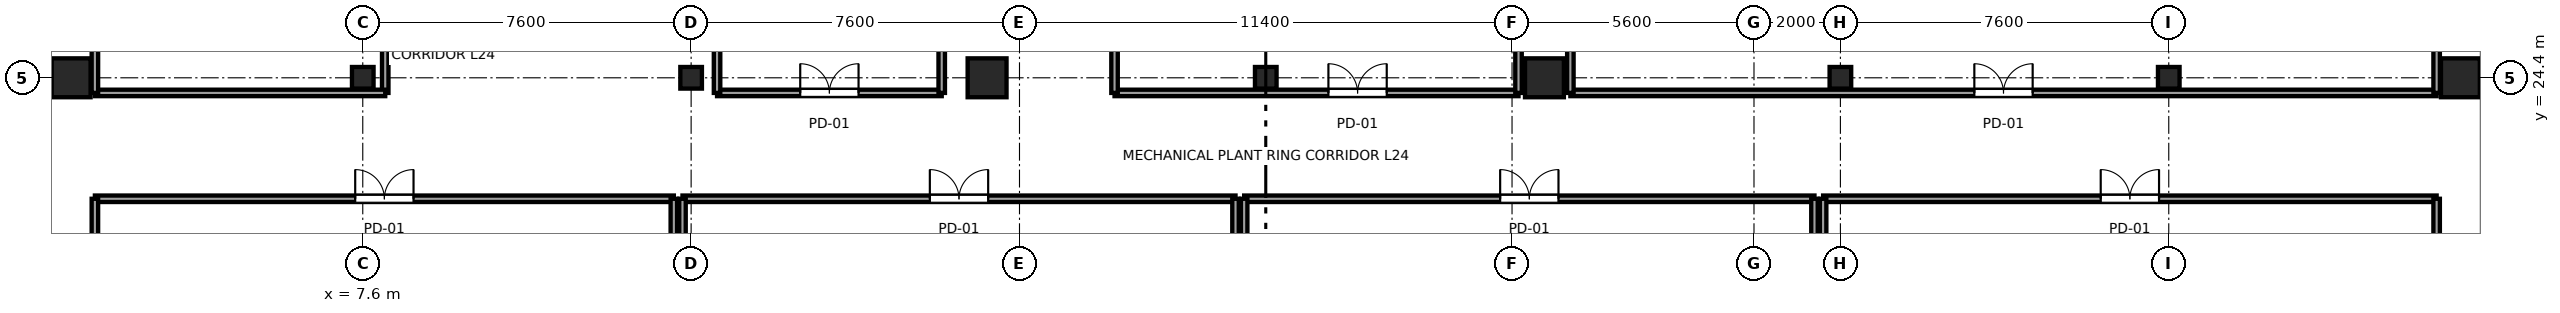
"""IFC4 building model, lengths in metres.
Left out: names, types, materials, properties, quantities, classifications, styles, units other than length and angle.
Written with IfcOpenShell. Run it as: python <this file> out.ifc"""

import sys

from ifc_helpers import new_model, si_unit, direction, frame, frame_2d, origin, origin_2d, place, context, subcontext, project, spatial, rectangle, i_section, extrude, source, transform, mapped, element, fill, save


model = new_model("IFC4")
c1 = context("Model", 3, precision=1e-05, world=origin(), true_north=direction((0.0, 1.0)))
c2 = subcontext(c1, "Body", "Model", "MODEL_VIEW")
j1 = project(units=[si_unit("LENGTHUNIT", "METRE"), si_unit("PLANEANGLEUNIT", "RADIAN")], contexts=[c1])
p1 = place(None, origin())
s1 = spatial("IfcSite", under=j1, at=p1, CompositionType="ELEMENT")
p2 = place(p1, origin())
s2 = spatial("IfcBuilding", under=s1, at=p2, CompositionType="ELEMENT")
p3 = place(p2, frame((0.0, 0.0, 95.9)))
s3 = spatial("IfcBuildingStorey", under=s2, at=p3, CompositionType="ELEMENT", Elevation=95.9)
m1 = source(origin(), c2, "Body", "SweptSolid", [
    extrude(rectangle(XDim=0.9, YDim=0.9, at=origin_2d()), origin(), (0.0, 0.0, 1.0), 5.0),
])
p4 = place(p3, frame((0.85, 24.4, 0.0), z_axis=(0.0, 0.0, 1.0), x_axis=(1.0, 0.0, 0.0)))
e1 = element("IfcColumn", 1, at=p4, inside=s3, PredefinedType="COLUMN", context=c2, shape_type="MappedRepresentation", body=[
    mapped(m1, transform((0.0, 0.0, 0.0), x_axis=(1.0, 0.0, 0.0), y_axis=(0.0, 1.0, 0.0), z_axis=(0.0, 0.0, 1.0), scale=1.0)),
])
m2 = source(origin(), c2, "Body", "SweptSolid", [
    extrude(i_section(OverallWidth=0.5, OverallDepth=0.5, WebThickness=0.022, FlangeThickness=0.034, at=origin_2d()), origin(), (0.0, 0.0, 1.0), 5.0),
])
for number, where, z_axis, x_axis in (
    (2, (7.6, 24.4, 0.0), (0.0, 0.0, 1.0), (1.0, 0.0, 0.0)),
    (3, (15.2, 24.4, 0.0), (0.0, 0.0, 1.0), (1.0, 0.0, 0.0)),
):
    element("IfcColumn", number, at=place(p3, frame(where, z_axis=z_axis, x_axis=x_axis)), inside=s3, PredefinedType="COLUMN", context=c2, shape_type="MappedRepresentation", body=[
        mapped(m2, transform((0.0, 0.0, 0.0), x_axis=(1.0, 0.0, 0.0), y_axis=(0.0, 1.0, 0.0), z_axis=(0.0, 0.0, 1.0), scale=1.0)),
    ])
for number, where, z_axis, x_axis in (
    (4, (22.05, 24.4, 0.0), (0.0, 0.0, 1.0), (1.0, 0.0, 0.0)),
    (5, (34.95, 24.4, 0.0), (0.0, 0.0, 1.0), (1.0, 0.0, 0.0)),
):
    element("IfcColumn", number, at=place(p3, frame(where, z_axis=z_axis, x_axis=x_axis)), inside=s3, PredefinedType="COLUMN", context=c2, shape_type="MappedRepresentation", body=[
        mapped(m1, transform((0.0, 0.0, 0.0), x_axis=(1.0, 0.0, 0.0), y_axis=(0.0, 1.0, 0.0), z_axis=(0.0, 0.0, 1.0), scale=1.0)),
    ])
for number, where, z_axis, x_axis in (
    (6, (41.8, 24.4, 0.0), (0.0, 0.0, 1.0), (1.0, 0.0, 0.0)),
    (7, (49.4, 24.4, 0.0), (0.0, 0.0, 1.0), (1.0, 0.0, 0.0)),
):
    element("IfcColumn", number, at=place(p3, frame(where, z_axis=z_axis, x_axis=x_axis)), inside=s3, PredefinedType="COLUMN", context=c2, shape_type="MappedRepresentation", body=[
        mapped(m2, transform((0.0, 0.0, 0.0), x_axis=(1.0, 0.0, 0.0), y_axis=(0.0, 1.0, 0.0), z_axis=(0.0, 0.0, 1.0), scale=1.0)),
    ])
p5 = place(p3, frame((56.15, 24.4, 0.0), z_axis=(0.0, 0.0, 1.0), x_axis=(1.0, 0.0, 0.0)))
e8 = element("IfcColumn", 8, at=p5, inside=s3, PredefinedType="COLUMN", context=c2, shape_type="MappedRepresentation", body=[
    mapped(m1, transform((0.0, 0.0, 0.0), x_axis=(1.0, 0.0, 0.0), y_axis=(0.0, 1.0, 0.0), z_axis=(0.0, 0.0, 1.0), scale=1.0)),
])
p6 = place(p3, frame((28.5, 24.4, 0.0), z_axis=(0.0, 0.0, 1.0), x_axis=(1.0, 0.0, 0.0)))
e9 = element("IfcColumn", 9, at=p6, inside=s3, PredefinedType="COLUMN", context=c2, shape_type="MappedRepresentation", body=[
    mapped(m2, transform((0.0, 0.0, 0.0), x_axis=(1.0, 0.0, 0.0), y_axis=(0.0, 1.0, 0.0), z_axis=(0.0, 0.0, 1.0), scale=1.0)),
])
p7 = place(p3, frame((8.12, 24.05, 0.0), z_axis=(0.0, 0.0, 1.0), x_axis=(0.0, 1.0, 0.0)))
e10 = element("IfcWall", 10, at=p7, inside=s3, PredefinedType="PARTITIONING", context=c2, shape_type="SweptSolid", body=[
    extrude(rectangle(XDim=11.55, YDim=0.15, at=frame_2d((5.775, 0.0))), origin(), (0.0, 0.0, 1.0), 4.82),
])
p8 = place(p7, frame((4.125, 0.0, 0.0)))
e11 = element("IfcOpeningElement", 11, at=p8, cuts=e10, PredefinedType="OPENING", context=c2, shape_type="SweptSolid", body=[
    extrude(rectangle(XDim=1.35, YDim=2.15, at=frame_2d((0.675, 1.075))), frame((0.0, 0.085, 0.0), z_axis=(0.0, -1.0, 0.0), x_axis=(1.0, 0.0, 0.0)), (0.0, 0.0, 1.0), 0.17),
])
p9 = place(p3, frame((1.4, 24.05, 0.0), z_axis=(0.0, 0.0, 1.0), x_axis=(1.0, 0.0, 0.0)))
e12 = element("IfcWall", 12, at=p9, inside=s3, PredefinedType="PARTITIONING", context=c2, shape_type="SweptSolid", body=[
    extrude(rectangle(XDim=6.72, YDim=0.15, at=frame_2d((3.36, 0.0))), origin(), (0.0, 0.0, 1.0), 4.82),
])
p10 = place(p3, frame((1.4, 24.05, 0.0), z_axis=(0.0, 0.0, 1.0), x_axis=(0.0, 1.0, 0.0)))
e13 = element("IfcWall", 13, at=p10, inside=s3, PredefinedType="PARTITIONING", context=c2, shape_type="SweptSolid", body=[
    extrude(rectangle(XDim=11.55, YDim=0.15, at=frame_2d((5.775, 0.0))), origin(), (0.0, 0.0, 1.0), 4.282),
])
p11 = place(p3, frame((15.8, 24.05, 0.0), z_axis=(0.0, 0.0, 1.0), x_axis=(1.0, 0.0, 0.0)))
e14 = element("IfcWall", 14, at=p11, inside=s3, PredefinedType="PARTITIONING", context=c2, shape_type="SweptSolid", body=[
    extrude(rectangle(XDim=5.2, YDim=0.15, at=frame_2d((2.6, 0.0))), origin(), (0.0, 0.0, 1.0), 4.82),
])
p12 = place(p11, frame((1.925, 0.0, 0.0)))
e15 = element("IfcOpeningElement", 15, at=p12, cuts=e14, PredefinedType="OPENING", context=c2, shape_type="SweptSolid", body=[
    extrude(rectangle(XDim=1.35, YDim=2.15, at=frame_2d((0.675, 1.075))), frame((0.0, 0.085, 0.0), z_axis=(0.0, -1.0, 0.0), x_axis=(1.0, 0.0, 0.0)), (0.0, 0.0, 1.0), 0.17),
])
for number, where, z_axis, x_axis in (
    (16, (15.8, 24.05, 0.0), (0.0, 0.0, 1.0), (0.0, 1.0, 0.0)),
    (17, (21.0, 24.05, 0.0), (0.0, 0.0, 1.0), (0.0, 1.0, 0.0)),
):
    element("IfcWall", number, at=place(p3, frame(where, z_axis=z_axis, x_axis=x_axis)), inside=s3, PredefinedType="PARTITIONING", context=c2, shape_type="SweptSolid", body=[
        extrude(rectangle(XDim=5.4, YDim=0.15, at=frame_2d((2.7, 0.0))), origin(), (0.0, 0.0, 1.0), 4.82),
    ])
p13 = place(p3, frame((25.0, 24.05, 0.0), z_axis=(0.0, 0.0, 1.0), x_axis=(1.0, 0.0, 0.0)))
e18 = element("IfcWall", 18, at=p13, inside=s3, PredefinedType="PARTITIONING", context=c2, shape_type="SweptSolid", body=[
    extrude(rectangle(XDim=9.35, YDim=0.15, at=frame_2d((4.675, 0.0))), origin(), (0.0, 0.0, 1.0), 4.82),
])
p14 = place(p13, frame((4.95, 0.0, 0.0)))
e19 = element("IfcOpeningElement", 19, at=p14, cuts=e18, PredefinedType="OPENING", context=c2, shape_type="SweptSolid", body=[
    extrude(rectangle(XDim=1.35, YDim=2.15, at=frame_2d((0.675, 1.075))), frame((0.0, 0.085, 0.0), z_axis=(0.0, -1.0, 0.0), x_axis=(1.0, 0.0, 0.0)), (0.0, 0.0, 1.0), 0.17),
])
for number, where, z_axis, x_axis in (
    (20, (25.0, 24.05, 0.0), (0.0, 0.0, 1.0), (0.0, 1.0, 0.0)),
    (21, (34.35, 24.05, 0.0), (0.0, 0.0, 1.0), (0.0, 1.0, 0.0)),
):
    element("IfcWall", number, at=place(p3, frame(where, z_axis=z_axis, x_axis=x_axis)), inside=s3, PredefinedType="PARTITIONING", context=c2, shape_type="SweptSolid", body=[
        extrude(rectangle(XDim=5.4, YDim=0.15, at=frame_2d((2.7, 0.0))), origin(), (0.0, 0.0, 1.0), 4.82),
    ])
p15 = place(p3, frame((35.55, 24.05, 0.0), z_axis=(0.0, 0.0, 1.0), x_axis=(1.0, 0.0, 0.0)))
e22 = element("IfcWall", 22, at=p15, inside=s3, PredefinedType="PARTITIONING", context=c2, shape_type="SweptSolid", body=[
    extrude(rectangle(XDim=20.05, YDim=0.15, at=frame_2d((10.025, 0.0))), origin(), (0.0, 0.0, 1.0), 4.82),
])
p16 = place(p15, frame((9.35, 0.0, 0.0)))
e23 = element("IfcOpeningElement", 23, at=p16, cuts=e22, PredefinedType="OPENING", context=c2, shape_type="SweptSolid", body=[
    extrude(rectangle(XDim=1.35, YDim=2.15, at=frame_2d((0.675, 1.075))), frame((0.0, 0.085, 0.0), z_axis=(0.0, -1.0, 0.0), x_axis=(1.0, 0.0, 0.0)), (0.0, 0.0, 1.0), 0.17),
])
for number, where, z_axis, x_axis in (
    (24, (35.55, 24.05, 0.0), (0.0, 0.0, 1.0), (0.0, 1.0, 0.0)),
    (25, (55.6, 24.05, 0.0), (0.0, 0.0, 1.0), (0.0, 1.0, 0.0)),
):
    element("IfcWall", number, at=place(p3, frame(where, z_axis=z_axis, x_axis=x_axis)), inside=s3, PredefinedType="PARTITIONING", context=c2, shape_type="SweptSolid", body=[
        extrude(rectangle(XDim=5.4, YDim=0.15, at=frame_2d((2.7, 0.0))), origin(), (0.0, 0.0, 1.0), 4.82),
    ])
p17 = place(p3, frame((1.4, 21.6, 0.0), z_axis=(0.0, 0.0, 1.0), x_axis=(1.0, 0.0, 0.0)))
e26 = element("IfcWall", 26, at=p17, inside=s3, PredefinedType="PARTITIONING", context=c2, shape_type="SweptSolid", body=[
    extrude(rectangle(XDim=13.4, YDim=0.15, at=frame_2d((6.7, 0.0))), origin(), (0.0, 0.0, 1.0), 4.82),
])
p18 = place(p17, frame((6.025, 0.0, 0.0)))
e27 = element("IfcOpeningElement", 27, at=p18, cuts=e26, PredefinedType="OPENING", context=c2, shape_type="SweptSolid", body=[
    extrude(rectangle(XDim=1.35, YDim=2.15, at=frame_2d((0.675, 1.075))), frame((0.0, 0.085, 0.0), z_axis=(0.0, -1.0, 0.0), x_axis=(1.0, 0.0, 0.0)), (0.0, 0.0, 1.0), 0.17),
])
p19 = place(p3, frame((1.4, 2.908, 0.0), z_axis=(0.0, 0.0, 1.0), x_axis=(0.0, 1.0, 0.0)))
e28 = element("IfcWall", 28, at=p19, inside=s3, PredefinedType="PARTITIONING", context=c2, shape_type="SweptSolid", body=[
    extrude(rectangle(XDim=18.692, YDim=0.15, at=frame_2d((9.346, 0.0))), origin(), (0.0, 0.0, 1.0), 4.282),
])
p20 = place(p3, frame((14.8, 0.405, 0.0), z_axis=(0.0, 0.0, 1.0), x_axis=(0.0, 1.0, 0.0)))
e29 = element("IfcWall", 29, at=p20, inside=s3, PredefinedType="PARTITIONING", context=c2, shape_type="SweptSolid", body=[
    extrude(rectangle(XDim=21.195, YDim=0.15, at=frame_2d((10.598, 0.0))), origin(), (0.0, 0.0, 1.0), 4.82),
])
p21 = place(p3, frame((15.0, 21.6, 0.0), z_axis=(0.0, 0.0, 1.0), x_axis=(1.0, 0.0, 0.0)))
e30 = element("IfcWall", 30, at=p21, inside=s3, PredefinedType="PARTITIONING", context=c2, shape_type="SweptSolid", body=[
    extrude(rectangle(XDim=12.8, YDim=0.15, at=frame_2d((6.4, 0.0))), origin(), (0.0, 0.0, 1.0), 4.82),
])
p22 = place(p21, frame((5.725, 0.0, 0.0)))
e31 = element("IfcOpeningElement", 31, at=p22, cuts=e30, PredefinedType="OPENING", context=c2, shape_type="SweptSolid", body=[
    extrude(rectangle(XDim=1.35, YDim=2.15, at=frame_2d((0.675, 1.075))), frame((0.0, 0.085, 0.0), z_axis=(0.0, -1.0, 0.0), x_axis=(1.0, 0.0, 0.0)), (0.0, 0.0, 1.0), 0.17),
])
p23 = place(p3, frame((15.0, 16.4, 0.0), z_axis=(0.0, 0.0, 1.0), x_axis=(0.0, 1.0, 0.0)))
e32 = element("IfcWall", 32, at=p23, inside=s3, PredefinedType="PARTITIONING", context=c2, shape_type="SweptSolid", body=[
    extrude(rectangle(XDim=5.2, YDim=0.15, at=frame_2d((2.6, 0.0))), origin(), (0.0, 0.0, 1.0), 4.82),
])
p24 = place(p3, frame((27.8, 16.405, 0.0), z_axis=(0.0, 0.0, 1.0), x_axis=(0.0, 1.0, 0.0)))
e33 = element("IfcWall", 33, at=p24, inside=s3, PredefinedType="PARTITIONING", context=c2, shape_type="SweptSolid", body=[
    extrude(rectangle(XDim=5.195, YDim=0.15, at=frame_2d((2.598, 0.0))), origin(), (0.0, 0.0, 1.0), 4.82),
])
p25 = place(p3, frame((28.0, 21.6, 0.0), z_axis=(0.0, 0.0, 1.0), x_axis=(1.0, 0.0, 0.0)))
e34 = element("IfcWall", 34, at=p25, inside=s3, PredefinedType="PARTITIONING", context=c2, shape_type="SweptSolid", body=[
    extrude(rectangle(XDim=13.2, YDim=0.15, at=frame_2d((6.6, 0.0))), origin(), (0.0, 0.0, 1.0), 4.82),
])
p26 = place(p25, frame((5.925, 0.0, 0.0)))
e35 = element("IfcOpeningElement", 35, at=p26, cuts=e34, PredefinedType="OPENING", context=c2, shape_type="SweptSolid", body=[
    extrude(rectangle(XDim=1.35, YDim=2.15, at=frame_2d((0.675, 1.075))), frame((0.0, 0.085, 0.0), z_axis=(0.0, -1.0, 0.0), x_axis=(1.0, 0.0, 0.0)), (0.0, 0.0, 1.0), 0.17),
])
p27 = place(p3, frame((28.0, 16.405, 0.0), z_axis=(0.0, 0.0, 1.0), x_axis=(0.0, 1.0, 0.0)))
e36 = element("IfcWall", 36, at=p27, inside=s3, PredefinedType="PARTITIONING", context=c2, shape_type="SweptSolid", body=[
    extrude(rectangle(XDim=5.195, YDim=0.15, at=frame_2d((2.598, 0.0))), origin(), (0.0, 0.0, 1.0), 4.82),
])
p28 = place(p3, frame((41.2, 16.4, 0.0), z_axis=(0.0, 0.0, 1.0), x_axis=(0.0, 1.0, 0.0)))
e37 = element("IfcWall", 37, at=p28, inside=s3, PredefinedType="PARTITIONING", context=c2, shape_type="SweptSolid", body=[
    extrude(rectangle(XDim=5.2, YDim=0.15, at=frame_2d((2.6, 0.0))), origin(), (0.0, 0.0, 1.0), 4.82),
])
p29 = place(p3, frame((41.4, 21.6, 0.0), z_axis=(0.0, 0.0, 1.0), x_axis=(1.0, 0.0, 0.0)))
e38 = element("IfcWall", 38, at=p29, inside=s3, PredefinedType="PARTITIONING", context=c2, shape_type="SweptSolid", body=[
    extrude(rectangle(XDim=14.2, YDim=0.15, at=frame_2d((7.1, 0.0))), origin(), (0.0, 0.0, 1.0), 4.82),
])
p30 = place(p29, frame((6.425, 0.0, 0.0)))
e39 = element("IfcOpeningElement", 39, at=p30, cuts=e38, PredefinedType="OPENING", context=c2, shape_type="SweptSolid", body=[
    extrude(rectangle(XDim=1.35, YDim=2.15, at=frame_2d((0.675, 1.075))), frame((0.0, 0.085, 0.0), z_axis=(0.0, -1.0, 0.0), x_axis=(1.0, 0.0, 0.0)), (0.0, 0.0, 1.0), 0.17),
])
p31 = place(p3, frame((41.4, 0.405, 0.0), z_axis=(0.0, 0.0, 1.0), x_axis=(0.0, 1.0, 0.0)))
e40 = element("IfcWall", 40, at=p31, inside=s3, PredefinedType="PARTITIONING", context=c2, shape_type="SweptSolid", body=[
    extrude(rectangle(XDim=21.195, YDim=0.15, at=frame_2d((10.598, 0.0))), origin(), (0.0, 0.0, 1.0), 4.82),
])
p32 = place(p3, frame((55.6, 2.908, 0.0), z_axis=(0.0, 0.0, 1.0), x_axis=(0.0, 1.0, 0.0)))
e41 = element("IfcWall", 41, at=p32, inside=s3, PredefinedType="PARTITIONING", context=c2, shape_type="SweptSolid", body=[
    extrude(rectangle(XDim=18.692, YDim=0.15, at=frame_2d((9.346, 0.0))), origin(), (0.0, 0.0, 1.0), 4.282),
])
m3 = source(origin(), c2, "Body", "SweptSolid", [
    extrude(rectangle(XDim=1.35, YDim=2.15, at=frame_2d((0.675, 1.075))), frame((0.0, 0.025, 0.0), z_axis=(0.0, -1.0, 0.0), x_axis=(1.0, 0.0, 0.0)), (0.0, 0.0, 1.0), 0.05),
])
p33 = place(p12, origin())
e42 = element("IfcDoor", 42, at=p33, inside=s3, OperationType="DOUBLE_DOOR_SINGLE_SWING", PredefinedType="DOOR", context=c2, shape_type="MappedRepresentation", body=[
    mapped(m3, transform((0.0, 0.0, 0.0), x_axis=(1.0, 0.0, 0.0), y_axis=(0.0, 1.0, 0.0), z_axis=(0.0, 0.0, 1.0), scale=1.0)),
])
fill(e15, e42)
p34 = place(p14, origin())
e43 = element("IfcDoor", 43, at=p34, inside=s3, OperationType="DOUBLE_DOOR_SINGLE_SWING", PredefinedType="DOOR", context=c2, shape_type="MappedRepresentation", body=[
    mapped(m3, transform((0.0, 0.0, 0.0), x_axis=(1.0, 0.0, 0.0), y_axis=(0.0, 1.0, 0.0), z_axis=(0.0, 0.0, 1.0), scale=1.0)),
])
fill(e19, e43)
p35 = place(p16, origin())
e44 = element("IfcDoor", 44, at=p35, inside=s3, OperationType="DOUBLE_DOOR_SINGLE_SWING", PredefinedType="DOOR", context=c2, shape_type="MappedRepresentation", body=[
    mapped(m3, transform((0.0, 0.0, 0.0), x_axis=(1.0, 0.0, 0.0), y_axis=(0.0, 1.0, 0.0), z_axis=(0.0, 0.0, 1.0), scale=1.0)),
])
fill(e23, e44)
p36 = place(p18, origin())
e45 = element("IfcDoor", 45, at=p36, inside=s3, OperationType="DOUBLE_DOOR_SINGLE_SWING", PredefinedType="DOOR", context=c2, shape_type="MappedRepresentation", body=[
    mapped(m3, transform((0.0, 0.0, 0.0), x_axis=(1.0, 0.0, 0.0), y_axis=(0.0, 1.0, 0.0), z_axis=(0.0, 0.0, 1.0), scale=1.0)),
])
fill(e27, e45)
p37 = place(p22, origin())
e46 = element("IfcDoor", 46, at=p37, inside=s3, OperationType="DOUBLE_DOOR_SINGLE_SWING", PredefinedType="DOOR", context=c2, shape_type="MappedRepresentation", body=[
    mapped(m3, transform((0.0, 0.0, 0.0), x_axis=(1.0, 0.0, 0.0), y_axis=(0.0, 1.0, 0.0), z_axis=(0.0, 0.0, 1.0), scale=1.0)),
])
fill(e31, e46)
p38 = place(p26, origin())
e47 = element("IfcDoor", 47, at=p38, inside=s3, OperationType="DOUBLE_DOOR_SINGLE_SWING", PredefinedType="DOOR", context=c2, shape_type="MappedRepresentation", body=[
    mapped(m3, transform((0.0, 0.0, 0.0), x_axis=(1.0, 0.0, 0.0), y_axis=(0.0, 1.0, 0.0), z_axis=(0.0, 0.0, 1.0), scale=1.0)),
])
fill(e35, e47)
p39 = place(p30, origin())
e48 = element("IfcDoor", 48, at=p39, inside=s3, OperationType="DOUBLE_DOOR_SINGLE_SWING", PredefinedType="DOOR", context=c2, shape_type="MappedRepresentation", body=[
    mapped(m3, transform((0.0, 0.0, 0.0), x_axis=(1.0, 0.0, 0.0), y_axis=(0.0, 1.0, 0.0), z_axis=(0.0, 0.0, 1.0), scale=1.0)),
])
fill(e39, e48)
save(model, sys.argv[1])
